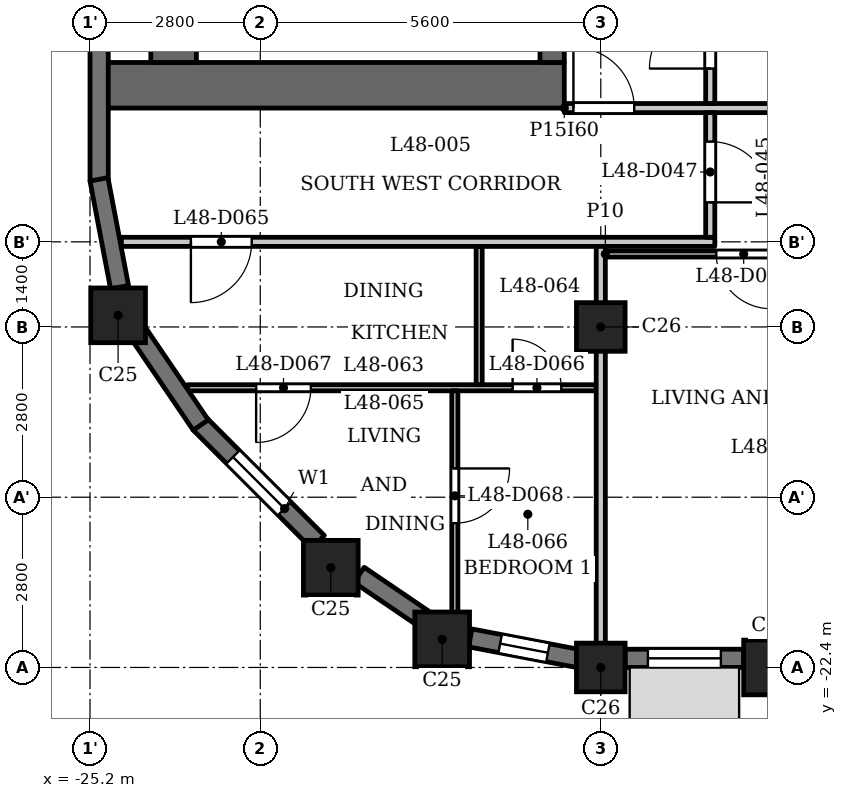
"""IFC4 building model, lengths in metres.
Left out: names, types, materials, properties, quantities, classifications, styles, units other than length and angle.
Written with IfcOpenShell. Run it as: python <this file> out.ifc"""

import sys

from ifc_helpers import new_model, si_unit, direction, frame, frame_2d, origin, origin_2d, place, context, subcontext, project, spatial, rectangle, extrude, element, fill, save


model = new_model("IFC4")
c1 = context("Model", 3, precision=1e-05, world=origin(), true_north=direction((0.0, 1.0)))
c2 = subcontext(c1, "Body", "Model", "MODEL_VIEW")
j1 = project(units=[si_unit("LENGTHUNIT", "METRE"), si_unit("PLANEANGLEUNIT", "RADIAN")], contexts=[c1])
p1 = place(None, origin())
s1 = spatial("IfcSite", under=j1, at=p1, CompositionType="ELEMENT")
p2 = place(p1, origin())
s2 = spatial("IfcBuilding", under=s1, at=p2, CompositionType="ELEMENT")
p3 = place(p2, frame((0.0, 0.0, 188.9)))
s3 = spatial("IfcBuildingStorey", under=s2, at=p3, CompositionType="ELEMENT", Elevation=188.9)
for number, where, z_axis, x_axis in (
    (1, (-19.409, -21.938, 0.0), (0.0, 0.0, 1.0), (1.0, 0.0, 0.0)),
    (2, (-14.0, -22.4, 0.0), (0.0, 0.0, 1.0), (1.0, 0.0, 0.0)),
    (3, (-24.738, -16.609, 0.0), (0.0, 0.0, 1.0), (1.0, 0.0, 0.0)),
    (4, (-21.24, -20.76, 0.0), (0.0, 0.0, 1.0), (1.0, 0.0, 0.0)),
):
    element("IfcColumn", number, at=place(p3, frame(where, z_axis=z_axis, x_axis=x_axis)), inside=s3, PredefinedType="COLUMN", context=c2, shape_type="SweptSolid", body=[
        extrude(rectangle(XDim=0.9, YDim=0.9, at=origin_2d()), origin(), (0.0, 0.0, 1.0), 3.5),
    ])
for number, where, z_axis, x_axis in (
    (5, (-16.8, -22.4, 0.0), (0.0, 0.0, 1.0), (1.0, 0.0, 0.0)),
    (6, (-16.8, -16.8, 0.0), (0.0, 0.0, 1.0), (1.0, 0.0, 0.0)),
):
    element("IfcColumn", number, at=place(p3, frame(where, z_axis=z_axis, x_axis=x_axis)), inside=s3, PredefinedType="COLUMN", context=c2, shape_type="SweptSolid", body=[
        extrude(rectangle(XDim=0.8, YDim=0.8, at=origin_2d()), origin(), (0.0, 0.0, 1.0), 3.5),
    ])
p4 = place(p3, frame((-23.397, -18.391, 0.0), z_axis=(0.0, 0.0, 1.0), x_axis=(0.707106781187, -0.707106781187, 0.0)))
e7 = element("IfcWall", 7, at=p4, inside=s3, PredefinedType="SOLIDWALL", context=c2, shape_type="SweptSolid", body=[
    extrude(rectangle(XDim=2.75, YDim=0.3, at=frame_2d((1.375, 0.0))), origin(), (0.0, 0.0, 1.0), 2.5),
])
p5 = place(p4, frame((0.775, 0.0, 0.6)))
e8 = element("IfcOpeningElement", 8, at=p5, cuts=e7, PredefinedType="OPENING", context=c2, shape_type="SweptSolid", body=[
    extrude(rectangle(XDim=1.2, YDim=1.55, at=frame_2d((0.6, 0.775))), frame((0.0, 0.16, 0.0), z_axis=(0.0, -1.0, 0.0), x_axis=(1.0, 0.0, 0.0)), (0.0, 0.0, 1.0), 0.32),
])
p6 = place(p3, frame((-20.775, -20.876, 0.0), z_axis=(0.0, 0.0, 1.0), x_axis=(0.827075824828, -0.562090366388, 0.0)))
e9 = element("IfcWall", 9, at=p6, inside=s3, PredefinedType="SOLIDWALL", context=c2, shape_type="SweptSolid", body=[
    extrude(rectangle(XDim=1.277, YDim=0.3, at=frame_2d((0.638, 0.0))), origin(), (0.0, 0.0, 1.0), 2.5),
])
p7 = place(p3, frame((-18.946, -21.914, 0.0), z_axis=(0.0, 0.0, 1.0), x_axis=(0.98230529033, -0.187286722942, 0.0)))
e10 = element("IfcWall", 10, at=p7, inside=s3, PredefinedType="SOLIDWALL", context=c2, shape_type="SweptSolid", body=[
    extrude(rectangle(XDim=1.799, YDim=0.3, at=frame_2d((0.899, 0.0))), origin(), (0.0, 0.0, 1.0), 2.5),
])
p8 = place(p7, frame((0.5, 0.0, 0.6)))
e11 = element("IfcOpeningElement", 11, at=p8, cuts=e10, PredefinedType="OPENING", context=c2, shape_type="SweptSolid", body=[
    extrude(rectangle(XDim=0.8, YDim=1.55, at=frame_2d((0.4, 0.775))), frame((0.0, 0.16, 0.0), z_axis=(0.0, -1.0, 0.0), x_axis=(1.0, 0.0, 0.0)), (0.0, 0.0, 1.0), 0.32),
])
p9 = place(p3, frame((-16.4, -22.25, 0.0), z_axis=(0.0, 0.0, 1.0), x_axis=(1.0, 0.0, 0.0)))
e12 = element("IfcWall", 12, at=p9, inside=s3, PredefinedType="SOLIDWALL", context=c2, shape_type="SweptSolid", body=[
    extrude(rectangle(XDim=1.95, YDim=0.3, at=frame_2d((0.975, 0.0))), origin(), (0.0, 0.0, 1.0), 2.5),
])
p10 = place(p9, frame((0.375, 0.0, 0.6)))
e13 = element("IfcOpeningElement", 13, at=p10, cuts=e12, PredefinedType="OPENING", context=c2, shape_type="SweptSolid", body=[
    extrude(rectangle(XDim=1.2, YDim=1.55, at=frame_2d((0.6, 0.775))), frame((0.0, 0.16, 0.0), z_axis=(0.0, -1.0, 0.0), x_axis=(1.0, 0.0, 0.0)), (0.0, 0.0, 1.0), 0.32),
])
p11 = place(p3, frame((-25.05, -11.65, 0.0), z_axis=(0.0, 0.0, 1.0), x_axis=(0.0, -1.0, 0.0)))
e14 = element("IfcWall", 14, at=p11, inside=s3, PredefinedType="SOLIDWALL", context=c2, shape_type="SweptSolid", body=[
    extrude(rectangle(XDim=2.75, YDim=0.3, at=frame_2d((1.375, 0.0))), origin(), (0.0, 0.0, 1.0), 2.5),
])
for number, where, z_axis, x_axis in (
    (15, (-25.053, -14.372, 0.0), (0.0, 0.0, 1.0), (0.187, -0.982, 0.0)),
    (16, (-24.394, -16.919, 0.0), (0.0, 0.0, 1.0), (0.562, -0.827, 0.0)),
):
    element("IfcWall", number, at=place(p3, frame(where, z_axis=z_axis, x_axis=x_axis)), inside=s3, PredefinedType="SOLIDWALL", context=c2, shape_type="SweptSolid", body=[
        extrude(rectangle(XDim=1.806, YDim=0.3, at=frame_2d((0.903, 0.0))), origin(), (0.0, 0.0, 1.0), 2.5),
    ])
p12 = place(p3, frame((-17.4, -12.825, 0.0), z_axis=(0.0, 0.0, 1.0), x_axis=(-1.0, 0.0, 0.0)))
e17 = element("IfcWall", 17, at=p12, inside=s3, PredefinedType="SHEAR", context=c2, shape_type="SweptSolid", body=[
    extrude(rectangle(XDim=7.6, YDim=0.75, at=frame_2d((3.8, 0.0))), origin(), (0.0, 0.0, 1.0), 3.2),
])
p13 = place(p3, frame((-17.6, -12.45, 0.0), z_axis=(0.0, 0.0, 1.0), x_axis=(0.0, 1.0, 0.0)))
e18 = element("IfcWall", 18, at=p13, inside=s3, PredefinedType="SHEAR", context=c2, shape_type="SweptSolid", body=[
    extrude(rectangle(XDim=24.9, YDim=0.4, at=frame_2d((12.45, 0.0))), origin(), (0.0, 0.0, 1.0), 3.2),
])
p14 = place(p13, frame((6.325, 0.0, 0.0)))
e19 = element("IfcOpeningElement", 19, at=p14, cuts=e18, PredefinedType="OPENING", context=c2, shape_type="SweptSolid", body=[
    extrude(rectangle(XDim=0.9, YDim=2.1, at=frame_2d((0.45, 1.05))), frame((0.0, 0.21, 0.0), z_axis=(0.0, -1.0, 0.0), x_axis=(1.0, 0.0, 0.0)), (0.0, 0.0, 1.0), 0.42),
])
p15 = place(p13, frame((9.925, 0.0, 0.0)))
e20 = element("IfcOpeningElement", 20, at=p15, cuts=e18, PredefinedType="OPENING", context=c2, shape_type="SweptSolid", body=[
    extrude(rectangle(XDim=0.9, YDim=2.1, at=frame_2d((0.45, 1.05))), frame((0.0, 0.21, 0.0), z_axis=(0.0, -1.0, 0.0), x_axis=(1.0, 0.0, 0.0)), (0.0, 0.0, 1.0), 0.42),
])
p16 = place(p13, frame((15.6, 0.0, 0.0)))
e21 = element("IfcOpeningElement", 21, at=p16, cuts=e18, PredefinedType="OPENING", context=c2, shape_type="SweptSolid", body=[
    extrude(rectangle(XDim=1.1, YDim=2.1, at=frame_2d((0.55, 1.05))), frame((0.0, 0.21, 0.0), z_axis=(0.0, -1.0, 0.0), x_axis=(1.0, 0.0, 0.0)), (0.0, 0.0, 1.0), 0.42),
])
p17 = place(p13, frame((18.0, 0.0, 0.0)))
e22 = element("IfcOpeningElement", 22, at=p17, cuts=e18, PredefinedType="OPENING", context=c2, shape_type="SweptSolid", body=[
    extrude(rectangle(XDim=1.1, YDim=2.1, at=frame_2d((0.55, 1.05))), frame((0.0, 0.21, 0.0), z_axis=(0.0, -1.0, 0.0), x_axis=(1.0, 0.0, 0.0)), (0.0, 0.0, 1.0), 0.42),
])
p18 = place(p13, frame((23.025, 0.0, 0.0)))
e23 = element("IfcOpeningElement", 23, at=p18, cuts=e18, PredefinedType="OPENING", context=c2, shape_type="SweptSolid", body=[
    extrude(rectangle(XDim=1.1, YDim=2.1, at=frame_2d((0.55, 1.05))), frame((0.0, 0.21, 0.0), z_axis=(0.0, -1.0, 0.0), x_axis=(1.0, 0.0, 0.0)), (0.0, 0.0, 1.0), 0.42),
])
p19 = place(p13, frame((0.775, 0.0, 0.0)))
e24 = element("IfcOpeningElement", 24, at=p19, cuts=e18, PredefinedType="OPENING", context=c2, shape_type="SweptSolid", body=[
    extrude(rectangle(XDim=1.1, YDim=2.1, at=frame_2d((0.55, 1.05))), frame((0.0, 0.21, 0.0), z_axis=(0.0, -1.0, 0.0), x_axis=(1.0, 0.0, 0.0)), (0.0, 0.0, 1.0), 0.42),
])
p20 = place(p13, frame((12.925, 0.0, 0.0)))
e25 = element("IfcOpeningElement", 25, at=p20, cuts=e18, PredefinedType="OPENING", context=c2, shape_type="SweptSolid", body=[
    extrude(rectangle(XDim=1.8, YDim=2.1, at=frame_2d((0.9, 1.05))), frame((0.0, 0.21, 0.0), z_axis=(0.0, -1.0, 0.0), x_axis=(1.0, 0.0, 0.0)), (0.0, 0.0, 1.0), 0.42),
])
p21 = place(p3, frame((-23.825, -12.45, 0.0), z_axis=(0.0, 0.0, 1.0), x_axis=(0.0, 1.0, 0.0)))
e26 = element("IfcWall", 26, at=p21, inside=s3, PredefinedType="SHEAR", context=c2, shape_type="SweptSolid", body=[
    extrude(rectangle(XDim=24.9, YDim=0.75, at=frame_2d((12.45, 0.0))), origin(), (0.0, 0.0, 1.0), 3.2),
])
p22 = place(p3, frame((-23.594, -17.8, 0.0), z_axis=(0.0, 0.0, 1.0), x_axis=(1.0, 0.0, 0.0)))
e27 = element("IfcWall", 27, at=p22, inside=s3, PredefinedType="PARTITIONING", context=c2, shape_type="SweptSolid", body=[
    extrude(rectangle(XDim=6.719, YDim=0.1, at=frame_2d((3.359, 0.0))), origin(), (0.0, 0.0, 1.0), 3.2),
])
p23 = place(p22, frame((5.344, 0.0, 0.0)))
e28 = element("IfcOpeningElement", 28, at=p23, cuts=e27, PredefinedType="OPENING", context=c2, shape_type="SweptSolid", body=[
    extrude(rectangle(XDim=0.8, YDim=2.1, at=frame_2d((0.4, 1.05))), frame((0.0, 0.06, 0.0), z_axis=(0.0, -1.0, 0.0), x_axis=(1.0, 0.0, 0.0)), (0.0, 0.0, 1.0), 0.12),
])
p24 = place(p22, frame((1.126, 0.0, 0.0)))
e29 = element("IfcOpeningElement", 29, at=p24, cuts=e27, PredefinedType="OPENING", context=c2, shape_type="SweptSolid", body=[
    extrude(rectangle(XDim=0.9, YDim=2.1, at=frame_2d((0.45, 1.05))), frame((0.0, 0.06, 0.0), z_axis=(0.0, -1.0, 0.0), x_axis=(1.0, 0.0, 0.0)), (0.0, 0.0, 1.0), 0.12),
])
p25 = place(p3, frame((-16.725, -15.6, 0.0), z_axis=(0.0, 0.0, 1.0), x_axis=(1.0, 0.0, 0.0)))
e30 = element("IfcWall", 30, at=p25, inside=s3, PredefinedType="PARTITIONING", context=c2, shape_type="SweptSolid", body=[
    extrude(rectangle(XDim=33.45, YDim=0.1, at=frame_2d((16.725, 0.0))), origin(), (0.0, 0.0, 1.0), 3.2),
])
p26 = place(p25, frame((4.075, 0.0, 0.0)))
e31 = element("IfcOpeningElement", 31, at=p26, cuts=e30, PredefinedType="OPENING", context=c2, shape_type="SweptSolid", body=[
    extrude(rectangle(XDim=0.8, YDim=2.1, at=frame_2d((0.4, 1.05))), frame((0.0, 0.06, 0.0), z_axis=(0.0, -1.0, 0.0), x_axis=(1.0, 0.0, 0.0)), (0.0, 0.0, 1.0), 0.12),
])
p27 = place(p25, frame((1.825, 0.0, 0.0)))
e32 = element("IfcOpeningElement", 32, at=p27, cuts=e30, PredefinedType="OPENING", context=c2, shape_type="SweptSolid", body=[
    extrude(rectangle(XDim=0.9, YDim=2.1, at=frame_2d((0.45, 1.05))), frame((0.0, 0.06, 0.0), z_axis=(0.0, -1.0, 0.0), x_axis=(1.0, 0.0, 0.0)), (0.0, 0.0, 1.0), 0.12),
])
p28 = place(p25, frame((9.675, 0.0, 0.0)))
e33 = element("IfcOpeningElement", 33, at=p28, cuts=e30, PredefinedType="OPENING", context=c2, shape_type="SweptSolid", body=[
    extrude(rectangle(XDim=0.8, YDim=2.1, at=frame_2d((0.4, 1.05))), frame((0.0, 0.06, 0.0), z_axis=(0.0, -1.0, 0.0), x_axis=(1.0, 0.0, 0.0)), (0.0, 0.0, 1.0), 0.12),
])
p29 = place(p25, frame((14.025, 0.0, 0.0)))
e34 = element("IfcOpeningElement", 34, at=p29, cuts=e30, PredefinedType="OPENING", context=c2, shape_type="SweptSolid", body=[
    extrude(rectangle(XDim=0.9, YDim=2.1, at=frame_2d((0.45, 1.05))), frame((0.0, 0.06, 0.0), z_axis=(0.0, -1.0, 0.0), x_axis=(1.0, 0.0, 0.0)), (0.0, 0.0, 1.0), 0.12),
])
p30 = place(p25, frame((20.875, 0.0, 0.0)))
e35 = element("IfcOpeningElement", 35, at=p30, cuts=e30, PredefinedType="OPENING", context=c2, shape_type="SweptSolid", body=[
    extrude(rectangle(XDim=0.8, YDim=2.1, at=frame_2d((0.4, 1.05))), frame((0.0, 0.06, 0.0), z_axis=(0.0, -1.0, 0.0), x_axis=(1.0, 0.0, 0.0)), (0.0, 0.0, 1.0), 0.12),
])
p31 = place(p25, frame((25.225, 0.0, 0.0)))
e36 = element("IfcOpeningElement", 36, at=p31, cuts=e30, PredefinedType="OPENING", context=c2, shape_type="SweptSolid", body=[
    extrude(rectangle(XDim=0.9, YDim=2.1, at=frame_2d((0.45, 1.05))), frame((0.0, 0.06, 0.0), z_axis=(0.0, -1.0, 0.0), x_axis=(1.0, 0.0, 0.0)), (0.0, 0.0, 1.0), 0.12),
])
p32 = place(p25, frame((28.475, 0.0, 0.0)))
e37 = element("IfcOpeningElement", 37, at=p32, cuts=e30, PredefinedType="OPENING", context=c2, shape_type="SweptSolid", body=[
    extrude(rectangle(XDim=0.8, YDim=2.1, at=frame_2d((0.4, 1.05))), frame((0.0, 0.06, 0.0), z_axis=(0.0, -1.0, 0.0), x_axis=(1.0, 0.0, 0.0)), (0.0, 0.0, 1.0), 0.12),
])
p33 = place(p25, frame((30.675, 0.0, 0.0)))
e38 = element("IfcOpeningElement", 38, at=p33, cuts=e30, PredefinedType="OPENING", context=c2, shape_type="SweptSolid", body=[
    extrude(rectangle(XDim=0.9, YDim=2.1, at=frame_2d((0.45, 1.05))), frame((0.0, 0.06, 0.0), z_axis=(0.0, -1.0, 0.0), x_axis=(1.0, 0.0, 0.0)), (0.0, 0.0, 1.0), 0.12),
])
p34 = place(p3, frame((-24.684, -15.4, 0.0), z_axis=(0.0, 0.0, 1.0), x_axis=(1.0, 0.0, 0.0)))
e39 = element("IfcWall", 39, at=p34, inside=s3, PredefinedType="PARTITIONING", context=c2, shape_type="SweptSolid", body=[
    extrude(rectangle(XDim=9.759, YDim=0.15, at=frame_2d((4.879, 0.0))), origin(), (0.0, 0.0, 1.0), 3.2),
])
p35 = place(p34, frame((1.143, 0.0, 0.0)))
e40 = element("IfcOpeningElement", 40, at=p35, cuts=e39, PredefinedType="OPENING", context=c2, shape_type="SweptSolid", body=[
    extrude(rectangle(XDim=1.0, YDim=2.1, at=frame_2d((0.5, 1.05))), frame((0.0, 0.085, 0.0), z_axis=(0.0, -1.0, 0.0), x_axis=(1.0, 0.0, 0.0)), (0.0, 0.0, 1.0), 0.17),
])
p36 = place(p3, frame((-17.4, -13.2, 0.0), z_axis=(0.0, 0.0, 1.0), x_axis=(1.0, 0.0, 0.0)))
e41 = element("IfcWall", 41, at=p36, inside=s3, PredefinedType="PARTITIONING", context=c2, shape_type="SweptSolid", body=[
    extrude(rectangle(XDim=34.8, YDim=0.15, at=frame_2d((17.4, 0.0))), origin(), (0.0, 0.0, 1.0), 3.2),
])
p37 = place(p36, frame((0.15, 0.0, 0.0)))
e42 = element("IfcOpeningElement", 42, at=p37, cuts=e41, PredefinedType="OPENING", context=c2, shape_type="SweptSolid", body=[
    extrude(rectangle(XDim=1.0, YDim=2.1, at=frame_2d((0.5, 1.05))), frame((0.0, 0.085, 0.0), z_axis=(0.0, -1.0, 0.0), x_axis=(1.0, 0.0, 0.0)), (0.0, 0.0, 1.0), 0.17),
])
p38 = place(p36, frame((33.55, 0.0, 0.0)))
e43 = element("IfcOpeningElement", 43, at=p38, cuts=e41, PredefinedType="OPENING", context=c2, shape_type="SweptSolid", body=[
    extrude(rectangle(XDim=1.0, YDim=2.1, at=frame_2d((0.5, 1.05))), frame((0.0, 0.085, 0.0), z_axis=(0.0, -1.0, 0.0), x_axis=(1.0, 0.0, 0.0)), (0.0, 0.0, 1.0), 0.17),
])
p39 = place(p36, frame((15.7, 0.0, 0.0)))
e44 = element("IfcOpeningElement", 44, at=p39, cuts=e41, PredefinedType="OPENING", context=c2, shape_type="SweptSolid", body=[
    extrude(rectangle(XDim=1.0, YDim=2.1, at=frame_2d((0.5, 1.05))), frame((0.0, 0.085, 0.0), z_axis=(0.0, -1.0, 0.0), x_axis=(1.0, 0.0, 0.0)), (0.0, 0.0, 1.0), 0.17),
])
p40 = place(p36, frame((26.9, 0.0, 0.0)))
e45 = element("IfcOpeningElement", 45, at=p40, cuts=e41, PredefinedType="OPENING", context=c2, shape_type="SweptSolid", body=[
    extrude(rectangle(XDim=1.0, YDim=2.1, at=frame_2d((0.5, 1.05))), frame((0.0, 0.085, 0.0), z_axis=(0.0, -1.0, 0.0), x_axis=(1.0, 0.0, 0.0)), (0.0, 0.0, 1.0), 0.17),
])
p41 = place(p3, frame((-19.2, -21.92, 0.0), z_axis=(0.0, 0.0, 1.0), x_axis=(0.0, 1.0, 0.0)))
e46 = element("IfcWall", 46, at=p41, inside=s3, PredefinedType="PARTITIONING", context=c2, shape_type="SweptSolid", body=[
    extrude(rectangle(XDim=4.07, YDim=0.1, at=frame_2d((2.035, 0.0))), origin(), (0.0, 0.0, 1.0), 3.2),
])
p42 = place(p41, frame((1.893, 0.0, 0.0)))
e47 = element("IfcOpeningElement", 47, at=p42, cuts=e46, PredefinedType="OPENING", context=c2, shape_type="SweptSolid", body=[
    extrude(rectangle(XDim=0.9, YDim=2.1, at=frame_2d((0.45, 1.05))), frame((0.0, 0.06, 0.0), z_axis=(0.0, -1.0, 0.0), x_axis=(1.0, 0.0, 0.0)), (0.0, 0.0, 1.0), 0.12),
])
p43 = place(p3, frame((-18.8, -17.75, 0.0), z_axis=(0.0, 0.0, 1.0), x_axis=(0.0, 1.0, 0.0)))
e48 = element("IfcWall", 48, at=p43, inside=s3, PredefinedType="PARTITIONING", context=c2, shape_type="SweptSolid", body=[
    extrude(rectangle(XDim=2.275, YDim=0.1, at=frame_2d((1.137, 0.0))), origin(), (0.0, 0.0, 1.0), 3.2),
])
p44 = place(p3, frame((-16.8, -22.31, 0.0), z_axis=(0.0, 0.0, 1.0), x_axis=(0.0, 1.0, 0.0)))
e49 = element("IfcWall", 49, at=p44, inside=s3, PredefinedType="PARTITIONING", context=c2, shape_type="SweptSolid", body=[
    extrude(rectangle(XDim=6.835, YDim=0.15, at=frame_2d((3.417, 0.0))), origin(), (0.0, 0.0, 1.0), 2.55),
])
p45 = place(p3, frame((-15.0, -15.325, 0.0), z_axis=(0.0, 0.0, 1.0), x_axis=(0.0, 1.0, 0.0)))
e50 = element("IfcWall", 50, at=p45, inside=s3, PredefinedType="PARTITIONING", context=c2, shape_type="SweptSolid", body=[
    extrude(rectangle(XDim=2.05, YDim=0.15, at=frame_2d((1.025, 0.0))), origin(), (0.0, 0.0, 1.0), 3.2),
])
p46 = place(p45, frame((0.574, 0.0, 0.0)))
e51 = element("IfcOpeningElement", 51, at=p46, cuts=e50, PredefinedType="OPENING", context=c2, shape_type="SweptSolid", body=[
    extrude(rectangle(XDim=1.0, YDim=2.1, at=frame_2d((0.5, 1.05))), frame((0.0, 0.085, 0.0), z_axis=(0.0, -1.0, 0.0), x_axis=(1.0, 0.0, 0.0)), (0.0, 0.0, 1.0), 0.17),
])
p47 = place(p3, frame((-15.0, -13.125, 0.0), z_axis=(0.0, 0.0, 1.0), x_axis=(0.0, 1.0, 0.0)))
e52 = element("IfcWall", 52, at=p47, inside=s3, PredefinedType="PARTITIONING", context=c2, shape_type="SweptSolid", body=[
    extrude(rectangle(XDim=6.356, YDim=0.15, at=frame_2d((3.178, 0.0))), origin(), (0.0, 0.0, 1.0), 3.2),
])
p48 = place(p47, frame((0.575, 0.0, 0.0)))
e53 = element("IfcOpeningElement", 53, at=p48, cuts=e52, PredefinedType="OPENING", context=c2, shape_type="SweptSolid", body=[
    extrude(rectangle(XDim=1.0, YDim=2.1, at=frame_2d((0.5, 1.05))), frame((0.0, 0.085, 0.0), z_axis=(0.0, -1.0, 0.0), x_axis=(1.0, 0.0, 0.0)), (0.0, 0.0, 1.0), 0.17),
])
p49 = place(p48, origin())
e54 = element("IfcDoor", 54, at=p49, inside=s3, OperationType="SINGLE_SWING_RIGHT", PredefinedType="DOOR", context=c2, shape_type="SweptSolid", body=[
    extrude(rectangle(XDim=1.0, YDim=2.1, at=frame_2d((0.5, 1.05))), frame((0.0, 0.025, 0.0), z_axis=(0.0, -1.0, 0.0), x_axis=(1.0, 0.0, 0.0)), (0.0, 0.0, 1.0), 0.05),
])
fill(e53, e54)
p50 = place(p37, origin())
e55 = element("IfcDoor", 55, at=p50, inside=s3, OperationType="SINGLE_SWING_RIGHT", PredefinedType="DOOR", context=c2, shape_type="SweptSolid", body=[
    extrude(rectangle(XDim=1.0, YDim=2.1, at=frame_2d((0.5, 1.05))), frame((0.0, 0.025, 0.0), z_axis=(0.0, -1.0, 0.0), x_axis=(1.0, 0.0, 0.0)), (0.0, 0.0, 1.0), 0.05),
])
fill(e42, e55)
p51 = place(p46, origin())
e56 = element("IfcDoor", 56, at=p51, inside=s3, OperationType="SINGLE_SWING_LEFT", PredefinedType="DOOR", context=c2, shape_type="SweptSolid", body=[
    extrude(rectangle(XDim=1.0, YDim=2.1, at=frame_2d((0.5, 1.05))), frame((0.0, 0.025, 0.0), z_axis=(0.0, -1.0, 0.0), x_axis=(1.0, 0.0, 0.0)), (0.0, 0.0, 1.0), 0.05),
])
fill(e51, e56)
p52 = place(p27, origin())
e57 = element("IfcDoor", 57, at=p52, inside=s3, OperationType="SINGLE_SWING_RIGHT", PredefinedType="DOOR", context=c2, shape_type="SweptSolid", body=[
    extrude(rectangle(XDim=0.9, YDim=2.1, at=frame_2d((0.45, 1.05))), frame((0.0, 0.025, 0.0), z_axis=(0.0, -1.0, 0.0), x_axis=(1.0, 0.0, 0.0)), (0.0, 0.0, 1.0), 0.05),
])
fill(e32, e57)
p53 = place(p35, origin())
e58 = element("IfcDoor", 58, at=p53, inside=s3, OperationType="SINGLE_SWING_LEFT", PredefinedType="DOOR", context=c2, shape_type="SweptSolid", body=[
    extrude(rectangle(XDim=1.0, YDim=2.1, at=frame_2d((0.5, 1.05))), frame((0.0, 0.025, 0.0), z_axis=(0.0, -1.0, 0.0), x_axis=(1.0, 0.0, 0.0)), (0.0, 0.0, 1.0), 0.05),
])
fill(e40, e58)
p54 = place(p23, origin())
e59 = element("IfcDoor", 59, at=p54, inside=s3, OperationType="SINGLE_SWING_RIGHT", PredefinedType="DOOR", context=c2, shape_type="SweptSolid", body=[
    extrude(rectangle(XDim=0.8, YDim=2.1, at=frame_2d((0.4, 1.05))), frame((0.0, 0.025, 0.0), z_axis=(0.0, -1.0, 0.0), x_axis=(1.0, 0.0, 0.0)), (0.0, 0.0, 1.0), 0.05),
])
fill(e28, e59)
p55 = place(p24, origin())
e60 = element("IfcDoor", 60, at=p55, inside=s3, OperationType="SINGLE_SWING_LEFT", PredefinedType="DOOR", context=c2, shape_type="SweptSolid", body=[
    extrude(rectangle(XDim=0.9, YDim=2.1, at=frame_2d((0.45, 1.05))), frame((0.0, 0.025, 0.0), z_axis=(0.0, -1.0, 0.0), x_axis=(1.0, 0.0, 0.0)), (0.0, 0.0, 1.0), 0.05),
])
fill(e29, e60)
p56 = place(p42, origin())
e61 = element("IfcDoor", 61, at=p56, inside=s3, OperationType="SINGLE_SWING_RIGHT", PredefinedType="DOOR", context=c2, shape_type="SweptSolid", body=[
    extrude(rectangle(XDim=0.9, YDim=2.1, at=frame_2d((0.45, 1.05))), frame((0.0, 0.025, 0.0), z_axis=(0.0, -1.0, 0.0), x_axis=(1.0, 0.0, 0.0)), (0.0, 0.0, 1.0), 0.05),
])
fill(e47, e61)
p57 = place(p5, origin())
e62 = element("IfcWindow", 62, at=p57, inside=s3, PartitioningType="SINGLE_PANEL", PredefinedType="WINDOW", context=c2, shape_type="SweptSolid", body=[
    extrude(rectangle(XDim=1.2, YDim=1.55, at=frame_2d((0.6, 0.775))), frame((0.0, 0.03, 0.0), z_axis=(0.0, -1.0, 0.0), x_axis=(1.0, 0.0, 0.0)), (0.0, 0.0, 1.0), 0.06),
])
fill(e8, e62)
p58 = place(p8, origin())
e63 = element("IfcWindow", 63, at=p58, inside=s3, PartitioningType="SINGLE_PANEL", PredefinedType="WINDOW", context=c2, shape_type="SweptSolid", body=[
    extrude(rectangle(XDim=0.8, YDim=1.55, at=frame_2d((0.4, 0.775))), frame((0.0, 0.03, 0.0), z_axis=(0.0, -1.0, 0.0), x_axis=(1.0, 0.0, 0.0)), (0.0, 0.0, 1.0), 0.06),
])
fill(e11, e63)
p59 = place(p10, origin())
e64 = element("IfcWindow", 64, at=p59, inside=s3, PartitioningType="SINGLE_PANEL", PredefinedType="WINDOW", context=c2, shape_type="SweptSolid", body=[
    extrude(rectangle(XDim=1.2, YDim=1.55, at=frame_2d((0.6, 0.775))), frame((0.0, 0.03, 0.0), z_axis=(0.0, -1.0, 0.0), x_axis=(1.0, 0.0, 0.0)), (0.0, 0.0, 1.0), 0.06),
])
fill(e13, e64)
save(model, sys.argv[1])
